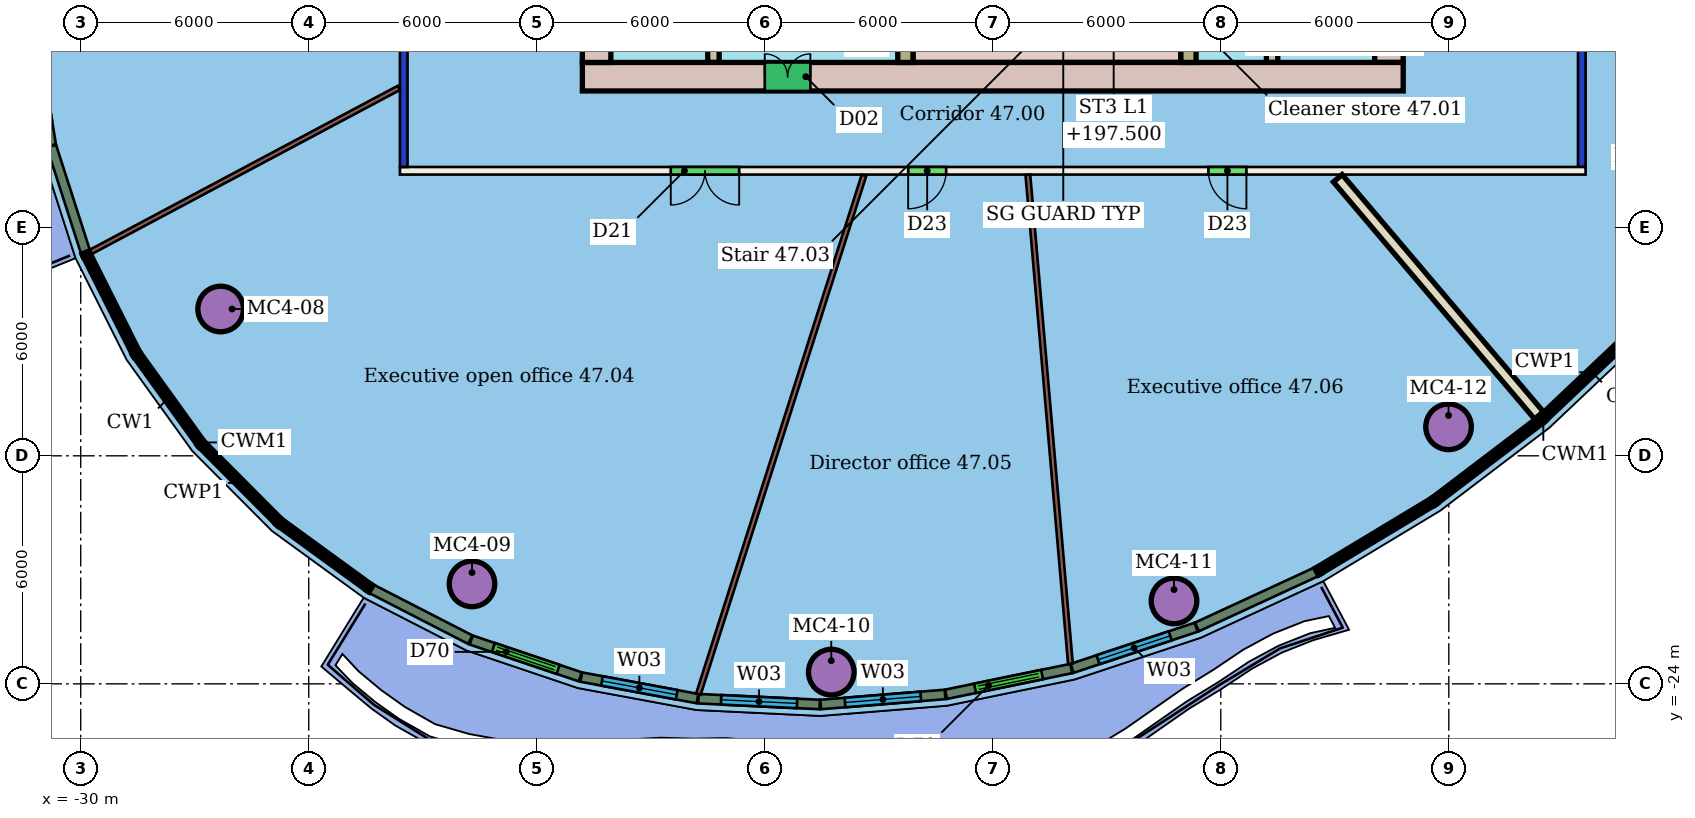
"""IFC4 building model, lengths in metres.
Left out: names, types, materials, properties, quantities, classifications, styles, units other than length and angle.
Written with IfcOpenShell. Run it as: python <this file> out.ifc"""

import sys

from ifc_helpers import new_model, si_unit, direction, frame, frame_2d, origin, origin_2d, place, context, subcontext, project, spatial, rectangle, hollow_circle, extrude, element, fill, save


model = new_model("IFC4")
c1 = context("Model", 3, precision=1e-05, world=origin(), true_north=direction((0.0, 1.0)))
c2 = subcontext(c1, "Body", "Model", "MODEL_VIEW")
j1 = project(units=[si_unit("LENGTHUNIT", "METRE"), si_unit("PLANEANGLEUNIT", "RADIAN")], contexts=[c1])
p1 = place(None, origin())
s1 = spatial("IfcSite", under=j1, at=p1, CompositionType="ELEMENT")
p2 = place(p1, origin())
s2 = spatial("IfcBuilding", under=s1, at=p2, CompositionType="ELEMENT")
p3 = place(p2, frame((0.0, 0.0, 195.7)))
s3 = spatial("IfcBuildingStorey", under=s2, at=p3, CompositionType="ELEMENT", Elevation=195.7)
for number, where, z_axis, x_axis in (
    (1, (-26.318, -14.137, 0.0), (0.0, 0.0, 1.0), (1.0, 0.0, 0.0)),
    (2, (-19.704, -21.37, 0.0), (0.0, 0.0, 1.0), (1.0, 0.0, 0.0)),
    (3, (-10.25, -23.691, 0.0), (0.0, 0.0, 1.0), (1.0, 0.0, 0.0)),
    (4, (-1.231, -21.819, 0.0), (0.0, 0.0, 1.0), (1.0, 0.0, 0.0)),
    (5, (5.993, -17.237, 0.0), (0.0, 0.0, 1.0), (1.0, 0.0, 0.0)),
):
    element("IfcColumn", number, at=place(p3, frame(where, z_axis=z_axis, x_axis=x_axis)), inside=s3, PredefinedType="COLUMN", context=c2, shape_type="SweptSolid", body=[
        extrude(hollow_circle(Radius=0.6, WallThickness=0.045, at=origin_2d()), origin(), (0.0, 0.0, 1.0), 3.45),
    ])
p4 = place(p3, frame((9.6, -10.5, 0.0), z_axis=(0.0, 0.0, 1.0), x_axis=(-1.0, 0.0, 0.0)))
e6 = element("IfcWall", 6, at=p4, inside=s3, PredefinedType="PARTITIONING", context=c2, shape_type="SweptSolid", body=[
    extrude(rectangle(XDim=31.2, YDim=0.2, at=frame_2d((15.6, 0.0))), origin(), (0.0, 0.0, 1.0), 3.45),
])
p5 = place(p4, frame((22.273, 0.0, 0.0)))
e7 = element("IfcOpeningElement", 7, at=p5, cuts=e6, PredefinedType="OPENING", context=c2, shape_type="SweptSolid", body=[
    extrude(rectangle(XDim=1.8, YDim=2.1, at=frame_2d((0.9, 1.05))), frame((0.0, 0.11, 0.0), z_axis=(0.0, -1.0, 0.0), x_axis=(1.0, 0.0, 0.0)), (0.0, 0.0, 1.0), 0.22),
])
p6 = place(p4, frame((16.826, 0.0, 0.0)))
e8 = element("IfcOpeningElement", 8, at=p6, cuts=e6, PredefinedType="OPENING", context=c2, shape_type="SweptSolid", body=[
    extrude(rectangle(XDim=1.0, YDim=2.4, at=frame_2d((0.5, 1.2))), frame((0.0, 0.11, 0.0), z_axis=(0.0, -1.0, 0.0), x_axis=(1.0, 0.0, 0.0)), (0.0, 0.0, 1.0), 0.22),
])
p7 = place(p4, frame((8.926, 0.0, 0.0)))
e9 = element("IfcOpeningElement", 9, at=p7, cuts=e6, PredefinedType="OPENING", context=c2, shape_type="SweptSolid", body=[
    extrude(rectangle(XDim=1.0, YDim=2.4, at=frame_2d((0.5, 1.2))), frame((0.0, 0.11, 0.0), z_axis=(0.0, -1.0, 0.0), x_axis=(1.0, 0.0, 0.0)), (0.0, 0.0, 1.0), 0.22),
])
p8 = place(p3, frame((-21.5, -10.4, 0.0), z_axis=(0.0, 0.0, 1.0), x_axis=(0.0, 1.0, 0.0)))
e10 = element("IfcWall", 10, at=p8, inside=s3, PredefinedType="PARTITIONING", context=c2, shape_type="SweptSolid", body=[
    extrude(rectangle(XDim=20.8, YDim=0.2, at=frame_2d((10.4, 0.0))), origin(), (0.0, 0.0, 1.0), 3.05),
])
p9 = place(p8, frame((11.02, 0.0, 0.0)))
e11 = element("IfcOpeningElement", 11, at=p9, cuts=e10, PredefinedType="OPENING", context=c2, shape_type="SweptSolid", body=[
    extrude(rectangle(XDim=1.8, YDim=2.4, at=frame_2d((0.9, 1.2))), frame((0.0, 0.11, 0.0), z_axis=(0.0, -1.0, 0.0), x_axis=(1.0, 0.0, 0.0)), (0.0, 0.0, 1.0), 0.22),
])
p10 = place(p3, frame((9.5, 10.4, 0.0), z_axis=(0.0, 0.0, 1.0), x_axis=(0.0, -1.0, 0.0)))
e12 = element("IfcWall", 12, at=p10, inside=s3, PredefinedType="PARTITIONING", context=c2, shape_type="SweptSolid", body=[
    extrude(rectangle(XDim=20.8, YDim=0.2, at=frame_2d((10.4, 0.0))), origin(), (0.0, 0.0, 1.0), 3.05),
])
p11 = place(p10, frame((10.281, 0.0, 0.0)))
e13 = element("IfcOpeningElement", 13, at=p11, cuts=e12, PredefinedType="OPENING", context=c2, shape_type="SweptSolid", body=[
    extrude(rectangle(XDim=1.8, YDim=2.4, at=frame_2d((0.9, 1.2))), frame((0.0, 0.11, 0.0), z_axis=(0.0, -1.0, 0.0), x_axis=(1.0, 0.0, 0.0)), (0.0, 0.0, 1.0), 0.22),
])
p12 = place(p3, frame((-29.743, -12.638, 0.0), z_axis=(0.0, 0.0, 1.0), x_axis=(0.8827357417, 0.46986978018, 0.0)))
e14 = element("IfcWall", 14, at=p12, inside=s3, PredefinedType="PARTITIONING", context=c2, shape_type="SweptSolid", body=[
    extrude(rectangle(XDim=9.191, YDim=0.125, at=frame_2d((4.596, 0.0))), origin(), (0.0, 0.0, 1.0), 3.45),
])
p13 = place(p3, frame((-13.745, -24.266, 0.0), z_axis=(0.0, 0.0, 1.0), x_axis=(0.304038528356, 0.952659736356, 0.0)))
e15 = element("IfcWall", 15, at=p13, inside=s3, PredefinedType="PARTITIONING", context=c2, shape_type="SweptSolid", body=[
    extrude(rectangle(XDim=14.325, YDim=0.125, at=frame_2d((7.163, 0.0))), origin(), (0.0, 0.0, 1.0), 3.45),
])
p14 = place(p3, frame((-3.956, -23.474, 0.0), z_axis=(0.0, 0.0, 1.0), x_axis=(-0.086750319473, 0.996230084906, 0.0)))
e16 = element("IfcWall", 16, at=p14, inside=s3, PredefinedType="PARTITIONING", context=c2, shape_type="SweptSolid", body=[
    extrude(rectangle(XDim=12.917, YDim=0.125, at=frame_2d((6.459, 0.0))), origin(), (0.0, 0.0, 1.0), 3.45),
])
p15 = place(p3, frame((8.373, -16.936, 0.0), z_axis=(0.0, 0.0, 1.0), x_axis=(-0.647061027519, 0.762438211704, 0.0)))
e17 = element("IfcWall", 17, at=p15, inside=s3, PredefinedType="PARTITIONING", context=c2, shape_type="SweptSolid", body=[
    extrude(rectangle(XDim=8.183, YDim=0.3, at=frame_2d((4.091, 0.0))), origin(), (0.0, 0.0, 1.0), 3.45),
])
p16 = place(p3, frame((-31.264, -6.836, 0.0), z_axis=(0.0, 0.0, 1.0), x_axis=(0.161248834654, -0.986913782112, 0.0)))
e18 = element("IfcWall", 18, at=p16, inside=s3, PredefinedType="SOLIDWALL", context=c2, shape_type="SweptSolid", body=[
    extrude(rectangle(XDim=3.03, YDim=0.25, at=frame_2d((1.515, 0.0))), origin(), (0.0, 0.0, 1.0), 3.1),
])
p17 = place(p16, frame((0.615, 0.0, 0.0)))
e19 = element("IfcOpeningElement", 19, at=p17, cuts=e18, PredefinedType="OPENING", context=c2, shape_type="SweptSolid", body=[
    extrude(rectangle(XDim=1.8, YDim=2.4, at=frame_2d((0.9, 1.2))), frame((0.0, 0.135, 0.0), z_axis=(0.0, -1.0, 0.0), x_axis=(1.0, 0.0, 0.0)), (0.0, 0.0, 1.0), 0.27),
])
for number, where, z_axis, x_axis in (
    (20, (-30.769, -9.852, 0.0), (0.0, 0.0, 1.0), (0.306, -0.952, 0.0)),
    (21, (-22.348, -21.503, 0.0), (0.0, 0.0, 1.0), (0.89, -0.457, 0.0)),
):
    element("IfcWall", number, at=place(p3, frame(where, z_axis=z_axis, x_axis=x_axis)), inside=s3, PredefinedType="SOLIDWALL", context=c2, shape_type="SweptSolid", body=[
        extrude(rectangle(XDim=2.921, YDim=0.25, at=frame_2d((1.46, 0.0))), origin(), (0.0, 0.0, 1.0), 3.1),
    ])
p18 = place(p3, frame((-19.725, -22.847, 0.0), z_axis=(0.0, 0.0, 1.0), x_axis=(0.947557264869, -0.319586028784, 0.0)))
e22 = element("IfcWall", 22, at=p18, inside=s3, PredefinedType="SOLIDWALL", context=c2, shape_type="SweptSolid", body=[
    extrude(rectangle(XDim=3.03, YDim=0.25, at=frame_2d((1.515, 0.0))), origin(), (0.0, 0.0, 1.0), 3.1),
])
p19 = place(p18, frame((0.615, 0.0, 0.0)))
e23 = element("IfcOpeningElement", 23, at=p19, cuts=e22, PredefinedType="OPENING", context=c2, shape_type="SweptSolid", body=[
    extrude(rectangle(XDim=1.8, YDim=2.4, at=frame_2d((0.9, 1.2))), frame((0.0, 0.135, 0.0), z_axis=(0.0, -1.0, 0.0), x_axis=(1.0, 0.0, 0.0)), (0.0, 0.0, 1.0), 0.27),
])
p20 = place(p3, frame((-16.829, -23.822, 0.0), z_axis=(0.0, 0.0, 1.0), x_axis=(0.98330230245, -0.181979619727, 0.0)))
e24 = element("IfcWall", 24, at=p20, inside=s3, PredefinedType="SOLIDWALL", context=c2, shape_type="SweptSolid", body=[
    extrude(rectangle(XDim=3.11, YDim=0.25, at=frame_2d((1.555, 0.0))), origin(), (0.0, 0.0, 1.0), 3.1),
])
p21 = place(p20, frame((0.555, 0.0, 0.9)))
e25 = element("IfcOpeningElement", 25, at=p21, cuts=e24, PredefinedType="OPENING", context=c2, shape_type="SweptSolid", body=[
    extrude(rectangle(XDim=2.0, YDim=2.1, at=frame_2d((1.0, 1.05))), frame((0.0, 0.135, 0.0), z_axis=(0.0, -1.0, 0.0), x_axis=(1.0, 0.0, 0.0)), (0.0, 0.0, 1.0), 0.27),
])
p22 = place(p3, frame((-13.747, -24.391, 0.0), z_axis=(0.0, 0.0, 1.0), x_axis=(0.998856706074, -0.047804609939, 0.0)))
e26 = element("IfcWall", 26, at=p22, inside=s3, PredefinedType="SOLIDWALL", context=c2, shape_type="SweptSolid", body=[
    extrude(rectangle(XDim=3.197, YDim=0.25, at=frame_2d((1.599, 0.0))), origin(), (0.0, 0.0, 1.0), 3.1),
])
p23 = place(p22, frame((0.598, 0.0, 0.9)))
e27 = element("IfcOpeningElement", 27, at=p23, cuts=e26, PredefinedType="OPENING", context=c2, shape_type="SweptSolid", body=[
    extrude(rectangle(XDim=2.0, YDim=2.1, at=frame_2d((1.0, 1.05))), frame((0.0, 0.135, 0.0), z_axis=(0.0, -1.0, 0.0), x_axis=(1.0, 0.0, 0.0)), (0.0, 0.0, 1.0), 0.27),
])
p24 = place(p3, frame((-10.529, -24.543, 0.0), z_axis=(0.0, 0.0, 1.0), x_axis=(0.996754245235, 0.080504500529, 0.0)))
e28 = element("IfcWall", 28, at=p24, inside=s3, PredefinedType="SOLIDWALL", context=c2, shape_type="SweptSolid", body=[
    extrude(rectangle(XDim=3.284, YDim=0.25, at=frame_2d((1.642, 0.0))), origin(), (0.0, 0.0, 1.0), 3.1),
])
p25 = place(p24, frame((0.642, 0.0, 0.9)))
e29 = element("IfcOpeningElement", 29, at=p25, cuts=e28, PredefinedType="OPENING", context=c2, shape_type="SweptSolid", body=[
    extrude(rectangle(XDim=2.0, YDim=2.1, at=frame_2d((1.0, 1.05))), frame((0.0, 0.135, 0.0), z_axis=(0.0, -1.0, 0.0), x_axis=(1.0, 0.0, 0.0)), (0.0, 0.0, 1.0), 0.27),
])
p26 = place(p3, frame((-7.233, -24.276, 0.0), z_axis=(0.0, 0.0, 1.0), x_axis=(0.979500828614, 0.201440131914, 0.0)))
e30 = element("IfcWall", 30, at=p26, inside=s3, PredefinedType="SOLIDWALL", context=c2, shape_type="SweptSolid", body=[
    extrude(rectangle(XDim=3.367, YDim=0.25, at=frame_2d((1.684, 0.0))), origin(), (0.0, 0.0, 1.0), 3.1),
])
p27 = place(p26, frame((0.783, 0.0, 0.0)))
e31 = element("IfcOpeningElement", 31, at=p27, cuts=e30, PredefinedType="OPENING", context=c2, shape_type="SweptSolid", body=[
    extrude(rectangle(XDim=1.8, YDim=2.4, at=frame_2d((0.9, 1.2))), frame((0.0, 0.135, 0.0), z_axis=(0.0, -1.0, 0.0), x_axis=(1.0, 0.0, 0.0)), (0.0, 0.0, 1.0), 0.27),
])
p28 = place(p3, frame((-3.913, -23.592, 0.0), z_axis=(0.0, 0.0, 1.0), x_axis=(0.949348540896, 0.314224995663, 0.0)))
e32 = element("IfcWall", 32, at=p28, inside=s3, PredefinedType="SOLIDWALL", context=c2, shape_type="SweptSolid", body=[
    extrude(rectangle(XDim=3.439, YDim=0.25, at=frame_2d((1.719, 0.0))), origin(), (0.0, 0.0, 1.0), 3.1),
])
p29 = place(p28, frame((0.719, 0.0, 0.9)))
e33 = element("IfcOpeningElement", 33, at=p29, cuts=e32, PredefinedType="OPENING", context=c2, shape_type="SweptSolid", body=[
    extrude(rectangle(XDim=2.0, YDim=2.1, at=frame_2d((1.0, 1.05))), frame((0.0, 0.135, 0.0), z_axis=(0.0, -1.0, 0.0), x_axis=(1.0, 0.0, 0.0)), (0.0, 0.0, 1.0), 0.27),
])
p30 = place(p3, frame((-0.628, -22.503, 0.0), z_axis=(0.0, 0.0, 1.0), x_axis=(0.907951105118, 0.419076115658, 0.0)))
e34 = element("IfcWall", 34, at=p30, inside=s3, PredefinedType="SOLIDWALL", context=c2, shape_type="SweptSolid", body=[
    extrude(rectangle(XDim=3.452, YDim=0.25, at=frame_2d((1.726, 0.0))), origin(), (0.0, 0.0, 1.0), 3.1),
])
p31 = place(p3, frame((-16.8, -8.025, 0.0), z_axis=(0.0, 0.0, 1.0), x_axis=(1.0, 0.0, 0.0)))
e35 = element("IfcWall", 35, at=p31, inside=s3, PredefinedType="SHEAR", context=c2, shape_type="SweptSolid", body=[
    extrude(rectangle(XDim=21.6, YDim=0.75, at=frame_2d((10.8, 0.0))), origin(), (0.0, 0.0, 1.0), 3.3),
])
p32 = place(p31, frame((4.8, 0.0, 0.0)))
e36 = element("IfcOpeningElement", 36, at=p32, cuts=e35, PredefinedType="OPENING", context=c2, shape_type="SweptSolid", body=[
    extrude(rectangle(XDim=1.2, YDim=2.1, at=frame_2d((0.6, 1.05))), frame((0.0, 0.385, 0.0), z_axis=(0.0, -1.0, 0.0), x_axis=(1.0, 0.0, 0.0)), (0.0, 0.0, 1.0), 0.77),
])
p33 = place(p3, frame((-16.425, 7.65, 0.0), z_axis=(0.0, 0.0, 1.0), x_axis=(0.0, -1.0, 0.0)))
e37 = element("IfcWall", 37, at=p33, inside=s3, PredefinedType="SHEAR", context=c2, shape_type="SweptSolid", body=[
    extrude(rectangle(XDim=15.3, YDim=0.75, at=frame_2d((7.65, 0.0))), origin(), (0.0, 0.0, 1.0), 3.3),
])
p34 = place(p33, frame((11.25, 0.0, 0.0)))
e38 = element("IfcOpeningElement", 38, at=p34, cuts=e37, PredefinedType="OPENING", context=c2, shape_type="SweptSolid", body=[
    extrude(rectangle(XDim=1.2, YDim=2.1, at=frame_2d((0.6, 1.05))), frame((0.0, 0.385, 0.0), z_axis=(0.0, -1.0, 0.0), x_axis=(1.0, 0.0, 0.0)), (0.0, 0.0, 1.0), 0.77),
])
p35 = place(p33, frame((2.85, 0.0, 0.0)))
e39 = element("IfcOpeningElement", 39, at=p35, cuts=e37, PredefinedType="OPENING", context=c2, shape_type="SweptSolid", body=[
    extrude(rectangle(XDim=1.2, YDim=2.1, at=frame_2d((0.6, 1.05))), frame((0.0, 0.385, 0.0), z_axis=(0.0, -1.0, 0.0), x_axis=(1.0, 0.0, 0.0)), (0.0, 0.0, 1.0), 0.77),
])
p36 = place(p3, frame((4.425, -7.65, 0.0), z_axis=(0.0, 0.0, 1.0), x_axis=(0.0, 1.0, 0.0)))
e40 = element("IfcWall", 40, at=p36, inside=s3, PredefinedType="SHEAR", context=c2, shape_type="SweptSolid", body=[
    extrude(rectangle(XDim=15.3, YDim=0.75, at=frame_2d((7.65, 0.0))), origin(), (0.0, 0.0, 1.0), 3.3),
])
p37 = place(p36, frame((2.85, 0.0, 0.0)))
e41 = element("IfcOpeningElement", 41, at=p37, cuts=e40, PredefinedType="OPENING", context=c2, shape_type="SweptSolid", body=[
    extrude(rectangle(XDim=1.2, YDim=2.1, at=frame_2d((0.6, 1.05))), frame((0.0, 0.385, 0.0), z_axis=(0.0, -1.0, 0.0), x_axis=(1.0, 0.0, 0.0)), (0.0, 0.0, 1.0), 0.77),
])
p38 = place(p36, frame((11.25, 0.0, 0.0)))
e42 = element("IfcOpeningElement", 42, at=p38, cuts=e40, PredefinedType="OPENING", context=c2, shape_type="SweptSolid", body=[
    extrude(rectangle(XDim=1.2, YDim=2.1, at=frame_2d((0.6, 1.05))), frame((0.0, 0.385, 0.0), z_axis=(0.0, -1.0, 0.0), x_axis=(1.0, 0.0, 0.0)), (0.0, 0.0, 1.0), 0.77),
])
p39 = place(p3, frame((-13.35, 7.65, 0.0), z_axis=(0.0, 0.0, 1.0), x_axis=(0.0, -1.0, 0.0)))
e43 = element("IfcWall", 43, at=p39, inside=s3, PredefinedType="SHEAR", context=c2, shape_type="SweptSolid", body=[
    extrude(rectangle(XDim=15.3, YDim=0.3, at=frame_2d((7.65, 0.0))), origin(), (0.0, 0.0, 1.0), 3.3),
])
p40 = place(p39, frame((6.9, 0.0, 0.0)))
e44 = element("IfcOpeningElement", 44, at=p40, cuts=e43, PredefinedType="OPENING", context=c2, shape_type="SweptSolid", body=[
    extrude(rectangle(XDim=1.5, YDim=2.1, at=frame_2d((0.75, 1.05))), frame((0.0, 0.16, 0.0), z_axis=(0.0, -1.0, 0.0), x_axis=(1.0, 0.0, 0.0)), (0.0, 0.0, 1.0), 0.32),
])
p41 = place(p3, frame((1.35, -7.65, 0.0), z_axis=(0.0, 0.0, 1.0), x_axis=(0.0, 1.0, 0.0)))
e45 = element("IfcWall", 45, at=p41, inside=s3, PredefinedType="SHEAR", context=c2, shape_type="SweptSolid", body=[
    extrude(rectangle(XDim=15.3, YDim=0.3, at=frame_2d((7.65, 0.0))), origin(), (0.0, 0.0, 1.0), 3.3),
])
p42 = place(p41, frame((1.56, 0.0, 0.0)))
e46 = element("IfcOpeningElement", 46, at=p42, cuts=e45, PredefinedType="OPENING", context=c2, shape_type="SweptSolid", body=[
    extrude(rectangle(XDim=1.0, YDim=2.1, at=frame_2d((0.5, 1.05))), frame((0.0, 0.16, 0.0), z_axis=(0.0, -1.0, 0.0), x_axis=(1.0, 0.0, 0.0)), (0.0, 0.0, 1.0), 0.32),
])
p43 = place(p41, frame((6.9, 0.0, 0.0)))
e47 = element("IfcOpeningElement", 47, at=p43, cuts=e45, PredefinedType="OPENING", context=c2, shape_type="SweptSolid", body=[
    extrude(rectangle(XDim=1.5, YDim=2.1, at=frame_2d((0.75, 1.05))), frame((0.0, 0.16, 0.0), z_axis=(0.0, -1.0, 0.0), x_axis=(1.0, 0.0, 0.0)), (0.0, 0.0, 1.0), 0.32),
])
p44 = place(p3, frame((-8.3, -3.88, 0.0), z_axis=(0.0, 0.0, 1.0), x_axis=(0.0, -1.0, 0.0)))
e48 = element("IfcWall", 48, at=p44, inside=s3, PredefinedType="SHEAR", context=c2, shape_type="SweptSolid", body=[
    extrude(rectangle(XDim=3.77, YDim=0.4, at=frame_2d((1.885, 0.0))), origin(), (0.0, 0.0, 1.0), 3.3),
])
p45 = place(p44, frame((1.11, 0.0, 0.0)))
e49 = element("IfcOpeningElement", 49, at=p45, cuts=e48, PredefinedType="OPENING", context=c2, shape_type="SweptSolid", body=[
    extrude(rectangle(XDim=1.2, YDim=2.1, at=frame_2d((0.6, 1.05))), frame((0.0, 0.21, 0.0), z_axis=(0.0, -1.0, 0.0), x_axis=(1.0, 0.0, 0.0)), (0.0, 0.0, 1.0), 0.42),
])
p46 = place(p3, frame((-0.85, -3.88, 0.0), z_axis=(0.0, 0.0, 1.0), x_axis=(0.0, -1.0, 0.0)))
e50 = element("IfcWall", 50, at=p46, inside=s3, PredefinedType="SHEAR", context=c2, shape_type="SweptSolid", body=[
    extrude(rectangle(XDim=3.77, YDim=0.4, at=frame_2d((1.885, 0.0))), origin(), (0.0, 0.0, 1.0), 3.3),
])
p47 = place(p3, frame((-8.1, -7.475, 0.0), z_axis=(0.0, 0.0, 1.0), x_axis=(1.0, 0.0, 0.0)))
e51 = element("IfcWall", 51, at=p47, inside=s3, PredefinedType="SHEAR", context=c2, shape_type="SweptSolid", body=[
    extrude(rectangle(XDim=7.05, YDim=0.35, at=frame_2d((3.525, 0.0))), origin(), (0.0, 0.0, 1.0), 3.3),
])
p48 = place(p5, origin())
e52 = element("IfcDoor", 52, at=p48, inside=s3, OperationType="DOUBLE_DOOR_SINGLE_SWING", PredefinedType="DOOR", context=c2, shape_type="SweptSolid", body=[
    extrude(rectangle(XDim=1.8, YDim=2.1, at=frame_2d((0.9, 1.05))), frame((0.0, 0.025, 0.0), z_axis=(0.0, -1.0, 0.0), x_axis=(1.0, 0.0, 0.0)), (0.0, 0.0, 1.0), 0.05),
])
fill(e7, e52)
p49 = place(p6, origin())
e53 = element("IfcDoor", 53, at=p49, inside=s3, OperationType="SINGLE_SWING_RIGHT", PredefinedType="DOOR", context=c2, shape_type="SweptSolid", body=[
    extrude(rectangle(XDim=1.0, YDim=2.4, at=frame_2d((0.5, 1.2))), frame((0.0, 0.025, 0.0), z_axis=(0.0, -1.0, 0.0), x_axis=(1.0, 0.0, 0.0)), (0.0, 0.0, 1.0), 0.05),
])
fill(e8, e53)
p50 = place(p7, origin())
e54 = element("IfcDoor", 54, at=p50, inside=s3, OperationType="SINGLE_SWING_LEFT", PredefinedType="DOOR", context=c2, shape_type="SweptSolid", body=[
    extrude(rectangle(XDim=1.0, YDim=2.4, at=frame_2d((0.5, 1.2))), frame((0.0, 0.025, 0.0), z_axis=(0.0, -1.0, 0.0), x_axis=(1.0, 0.0, 0.0)), (0.0, 0.0, 1.0), 0.05),
])
fill(e9, e54)
p51 = place(p19, origin())
e55 = element("IfcDoor", 55, at=p51, inside=s3, OperationType="DOUBLE_DOOR_SLIDING", PredefinedType="DOOR", context=c2, shape_type="SweptSolid", body=[
    extrude(rectangle(XDim=1.8, YDim=2.4, at=frame_2d((0.9, 1.2))), frame((0.0, 0.025, 0.0), z_axis=(0.0, -1.0, 0.0), x_axis=(1.0, 0.0, 0.0)), (0.0, 0.0, 1.0), 0.05),
])
fill(e23, e55)
p52 = place(p21, origin())
e56 = element("IfcWindow", 56, at=p52, inside=s3, PartitioningType="SINGLE_PANEL", PredefinedType="WINDOW", context=c2, shape_type="SweptSolid", body=[
    extrude(rectangle(XDim=2.0, YDim=2.1, at=frame_2d((1.0, 1.05))), frame((0.0, 0.03, 0.0), z_axis=(0.0, -1.0, 0.0), x_axis=(1.0, 0.0, 0.0)), (0.0, 0.0, 1.0), 0.06),
])
fill(e25, e56)
p53 = place(p23, origin())
e57 = element("IfcWindow", 57, at=p53, inside=s3, PartitioningType="SINGLE_PANEL", PredefinedType="WINDOW", context=c2, shape_type="SweptSolid", body=[
    extrude(rectangle(XDim=2.0, YDim=2.1, at=frame_2d((1.0, 1.05))), frame((0.0, 0.03, 0.0), z_axis=(0.0, -1.0, 0.0), x_axis=(1.0, 0.0, 0.0)), (0.0, 0.0, 1.0), 0.06),
])
fill(e27, e57)
p54 = place(p25, origin())
e58 = element("IfcWindow", 58, at=p54, inside=s3, PartitioningType="SINGLE_PANEL", PredefinedType="WINDOW", context=c2, shape_type="SweptSolid", body=[
    extrude(rectangle(XDim=2.0, YDim=2.1, at=frame_2d((1.0, 1.05))), frame((0.0, 0.03, 0.0), z_axis=(0.0, -1.0, 0.0), x_axis=(1.0, 0.0, 0.0)), (0.0, 0.0, 1.0), 0.06),
])
fill(e29, e58)
p55 = place(p27, origin())
e59 = element("IfcDoor", 59, at=p55, inside=s3, OperationType="DOUBLE_DOOR_SLIDING", PredefinedType="DOOR", context=c2, shape_type="SweptSolid", body=[
    extrude(rectangle(XDim=1.8, YDim=2.4, at=frame_2d((0.9, 1.2))), frame((0.0, 0.025, 0.0), z_axis=(0.0, -1.0, 0.0), x_axis=(1.0, 0.0, 0.0)), (0.0, 0.0, 1.0), 0.05),
])
fill(e31, e59)
p56 = place(p29, origin())
e60 = element("IfcWindow", 60, at=p56, inside=s3, PartitioningType="SINGLE_PANEL", PredefinedType="WINDOW", context=c2, shape_type="SweptSolid", body=[
    extrude(rectangle(XDim=2.0, YDim=2.1, at=frame_2d((1.0, 1.05))), frame((0.0, 0.03, 0.0), z_axis=(0.0, -1.0, 0.0), x_axis=(1.0, 0.0, 0.0)), (0.0, 0.0, 1.0), 0.06),
])
fill(e33, e60)
p57 = place(p32, origin())
e61 = element("IfcDoor", 61, at=p57, inside=s3, OperationType="DOUBLE_DOOR_SINGLE_SWING", PredefinedType="NOTDEFINED", context=c2, shape_type="SweptSolid", body=[
    extrude(rectangle(XDim=1.2, YDim=2.1, at=frame_2d((0.6, 1.05))), frame((0.0, 0.025, 0.0), z_axis=(0.0, -1.0, 0.0), x_axis=(1.0, 0.0, 0.0)), (0.0, 0.0, 1.0), 0.05),
])
fill(e36, e61)
save(model, sys.argv[1])
